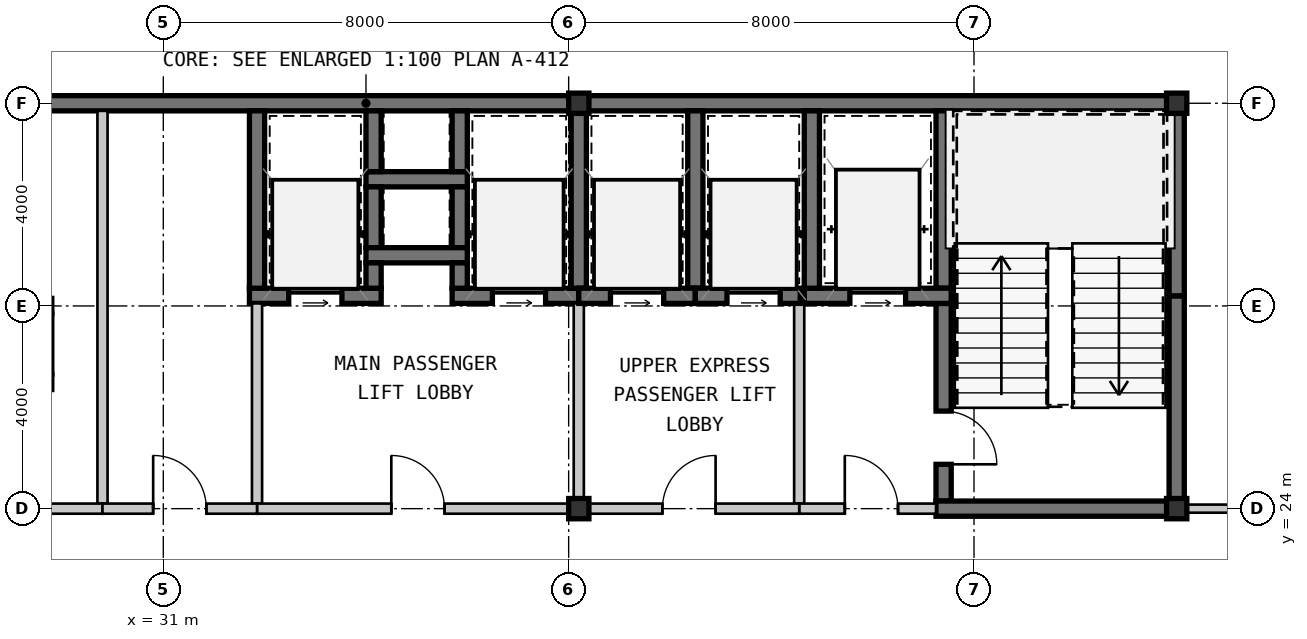
"""IFC4 building model, lengths in metres.
Left out: names, types, materials, properties, quantities, classifications, styles, units other than length and angle.
Written with IfcOpenShell. Run it as: python <this file> out.ifc"""

import sys

from ifc_helpers import new_model, si_unit, direction, frame, frame_2d, origin, origin_2d, place, context, subcontext, project, spatial, rectangle, hollow_rectangle, extrude, source, transform, mapped, element, fill, save


model = new_model("IFC4")
c1 = context("Model", 3, precision=1e-05, world=origin(), true_north=direction((0.0, 1.0)))
c2 = subcontext(c1, "Body", "Model", "MODEL_VIEW")
j1 = project(units=[si_unit("LENGTHUNIT", "METRE"), si_unit("PLANEANGLEUNIT", "RADIAN")], contexts=[c1])
p1 = place(None, origin())
s1 = spatial("IfcSite", under=j1, at=p1, CompositionType="ELEMENT")
p2 = place(p1, origin())
s2 = spatial("IfcBuilding", under=s1, at=p2, CompositionType="ELEMENT")
p3 = place(p2, frame((0.0, 0.0, 116.55)))
s3 = spatial("IfcBuildingStorey", under=s2, at=p3, CompositionType="ELEMENT", Elevation=116.55)
m1 = source(origin(), c2, "Body", "SweptSolid", [
    extrude(hollow_rectangle(XDim=0.4, YDim=0.4, WallThickness=0.016, at=origin_2d()), origin(), (0.0, 0.0, 1.0), 3.85),
])
for number, where, z_axis, x_axis in (
    (1, (39.2, 24.0, 0.0), (0.0, 0.0, 1.0), (1.0, 0.0, 0.0)),
    (2, (51.0, 24.0, 0.0), (0.0, 0.0, 1.0), (1.0, 0.0, 0.0)),
    (3, (39.2, 32.0, 0.0), (0.0, 0.0, 1.0), (1.0, 0.0, 0.0)),
    (4, (51.0, 32.0, 0.0), (0.0, 0.0, 1.0), (1.0, 0.0, 0.0)),
):
    element("IfcColumn", number, at=place(p3, frame(where, z_axis=z_axis, x_axis=x_axis)), inside=s3, PredefinedType="COLUMN", context=c2, shape_type="MappedRepresentation", body=[
        mapped(m1, transform((0.0, 0.0, 0.0), scale=1.0)),
    ])
m2 = source(origin(), c2, "Body", "SweptSolid", [
    extrude(rectangle(XDim=11.2, YDim=0.3, at=frame_2d((5.6, 0.0))), origin(), (0.0, 0.0, 1.0), 3.63),
])
p4 = place(p3, frame((28.0, 32.0, 0.0), z_axis=(0.0, 0.0, 1.0), x_axis=(1.0, 0.0, 0.0)))
e5 = element("IfcWall", 5, at=p4, inside=s3, PredefinedType="SHEAR", context=c2, shape_type="MappedRepresentation", body=[
    mapped(m2, transform((0.0, 0.0, 0.0), scale=1.0)),
])
m3 = source(origin(), c2, "Body", "SweptSolid", [
    extrude(rectangle(XDim=11.95, YDim=0.3, at=frame_2d((5.975, 0.0))), origin(), (0.0, 0.0, 1.0), 3.63),
])
p5 = place(p3, frame((39.2, 32.0, 0.0), z_axis=(0.0, 0.0, 1.0), x_axis=(1.0, 0.0, 0.0)))
e6 = element("IfcWall", 6, at=p5, inside=s3, PredefinedType="SHEAR", context=c2, shape_type="MappedRepresentation", body=[
    mapped(m3, transform((0.0, 0.0, 0.0), scale=1.0)),
])
m4 = source(origin(), c2, "Body", "SweptSolid", [
    extrude(rectangle(XDim=4.05, YDim=0.3, at=frame_2d((2.025, 0.0))), origin(), (0.0, 0.0, 1.0), 3.63),
])
p6 = place(p3, frame((51.0, 24.15, 0.0), z_axis=(0.0, 0.0, 1.0), x_axis=(0.0, 1.0, 0.0)))
e7 = element("IfcWall", 7, at=p6, inside=s3, PredefinedType="SHEAR", context=c2, shape_type="MappedRepresentation", body=[
    mapped(m4, transform((0.0, 0.0, 0.0), scale=1.0)),
])
m5 = source(origin(), c2, "Body", "SweptSolid", [
    extrude(rectangle(XDim=3.65, YDim=0.3, at=frame_2d((1.825, 0.0))), origin(), (0.0, 0.0, 1.0), 3.63),
])
p7 = place(p3, frame((51.0, 28.2, 0.0), z_axis=(0.0, 0.0, 1.0), x_axis=(0.0, 1.0, 0.0)))
e8 = element("IfcWall", 8, at=p7, inside=s3, PredefinedType="SHEAR", context=c2, shape_type="MappedRepresentation", body=[
    mapped(m5, transform((0.0, 0.0, 0.0), scale=1.0)),
])
m6 = source(origin(), c2, "Body", "SweptSolid", [
    extrude(rectangle(XDim=3.5, YDim=0.3, at=frame_2d((1.75, 0.0))), origin(), (0.0, 0.0, 1.0), 3.63),
])
p8 = place(p3, frame((46.4, 31.85, 0.0), z_axis=(0.0, 0.0, 1.0), x_axis=(0.0, -1.0, 0.0)))
e9 = element("IfcWall", 9, at=p8, inside=s3, PredefinedType="SHEAR", context=c2, shape_type="MappedRepresentation", body=[
    mapped(m6, transform((0.0, 0.0, 0.0), scale=1.0)),
])
m7 = source(origin(), c2, "Body", "SweptSolid", [
    extrude(rectangle(XDim=3.9, YDim=0.3, at=frame_2d((1.95, 0.0))), origin(), (0.0, 0.0, 1.0), 3.63),
])
p9 = place(p3, frame((46.4, 28.05, 0.0), z_axis=(0.0, 0.0, 1.0), x_axis=(0.0, -1.0, 0.0)))
e10 = element("IfcWall", 10, at=p9, inside=s3, PredefinedType="SHEAR", context=c2, shape_type="MappedRepresentation", body=[
    mapped(m7, transform((0.0, 0.0, 0.0), scale=1.0)),
])
m8 = source(origin(), c2, "Body", "SweptSolid", [
    extrude(rectangle(XDim=1.05, YDim=2.1, at=frame_2d((0.525, 1.05))), frame((0.0, 0.16, 0.0), z_axis=(0.0, -1.0, 0.0), x_axis=(1.0, 0.0, 0.0)), (0.0, 0.0, 1.0), 0.32),
])
p10 = place(p9, frame((2.125, 0.0, 0.0)))
e11 = element("IfcOpeningElement", 11, at=p10, cuts=e10, PredefinedType="OPENING", context=c2, shape_type="MappedRepresentation", body=[
    mapped(m8, transform((0.0, 0.0, 0.0), scale=1.0)),
])
m9 = source(origin(), c2, "Body", "SweptSolid", [
    extrude(rectangle(XDim=4.9, YDim=0.3, at=frame_2d((2.45, 0.0))), origin(), (0.0, 0.0, 1.0), 3.63),
])
p11 = place(p3, frame((46.25, 24.0, 0.0), z_axis=(0.0, 0.0, 1.0), x_axis=(1.0, 0.0, 0.0)))
e12 = element("IfcWall", 12, at=p11, inside=s3, PredefinedType="SHEAR", context=c2, shape_type="MappedRepresentation", body=[
    mapped(m9, transform((0.0, 0.0, 0.0), scale=1.0)),
])
m10 = source(origin(), c2, "Body", "SweptSolid", [
    extrude(rectangle(XDim=2.9, YDim=0.3, at=frame_2d((1.45, 0.0))), origin(), (0.0, 0.0, 1.0), 3.63),
])
p12 = place(p3, frame((43.65, 28.2, 0.0), z_axis=(0.0, 0.0, 1.0), x_axis=(1.0, 0.0, 0.0)))
e13 = element("IfcWall", 13, at=p12, inside=s3, PredefinedType="SHEAR", context=c2, shape_type="MappedRepresentation", body=[
    mapped(m10, transform((0.0, 0.0, 0.0), scale=1.0)),
])
m11 = source(origin(), c2, "Body", "SweptSolid", [
    extrude(rectangle(XDim=1.1, YDim=2.15, at=frame_2d((0.55, 1.075))), frame((0.0, 0.16, 0.0), z_axis=(0.0, -1.0, 0.0), x_axis=(1.0, 0.0, 0.0)), (0.0, 0.0, 1.0), 0.32),
])
p13 = place(p12, frame((0.9, 0.0, 0.0)))
e14 = element("IfcOpeningElement", 14, at=p13, cuts=e13, PredefinedType="OPENING", context=c2, shape_type="MappedRepresentation", body=[
    mapped(m11, transform((0.0, 0.0, 0.0), scale=1.0)),
])
p14 = place(p3, frame((43.8, 31.85, 0.0), z_axis=(0.0, 0.0, 1.0), x_axis=(0.0, -1.0, 0.0)))
e15 = element("IfcWall", 15, at=p14, inside=s3, PredefinedType="SHEAR", context=c2, shape_type="MappedRepresentation", body=[
    mapped(m6, transform((0.0, 0.0, 0.0), scale=1.0)),
])
m12 = source(origin(), c2, "Body", "SweptSolid", [
    extrude(rectangle(XDim=3.95, YDim=0.2, at=frame_2d((1.975, 0.0))), origin(), (0.0, 0.0, 1.0), 3.63),
])
p15 = place(p3, frame((43.55, 28.05, 0.0), z_axis=(0.0, 0.0, 1.0), x_axis=(0.0, -1.0, 0.0)))
e16 = element("IfcWall", 16, at=p15, inside=s3, PredefinedType="SOLIDWALL", context=c2, shape_type="MappedRepresentation", body=[
    mapped(m12, transform((0.0, 0.0, 0.0), scale=1.0)),
])
m13 = source(origin(), c2, "Body", "SweptSolid", [
    extrude(rectangle(XDim=2.7, YDim=0.2, at=frame_2d((1.35, 0.0))), origin(), (0.0, 0.0, 1.0), 3.097),
])
p16 = place(p3, frame((43.55, 24.0, 0.0), z_axis=(0.0, 0.0, 1.0), x_axis=(1.0, 0.0, 0.0)))
e17 = element("IfcWall", 17, at=p16, inside=s3, PredefinedType="SOLIDWALL", context=c2, shape_type="MappedRepresentation", body=[
    mapped(m13, transform((0.0, 0.0, 0.0), scale=1.0)),
])
m14 = source(origin(), c2, "Body", "SweptSolid", [
    extrude(rectangle(XDim=1.05, YDim=2.1, at=frame_2d((0.525, 1.05))), frame((0.0, 0.11, 0.0), z_axis=(0.0, -1.0, 0.0), x_axis=(1.0, 0.0, 0.0)), (0.0, 0.0, 1.0), 0.22),
])
p17 = place(p16, frame((0.9, 0.0, 0.0)))
e18 = element("IfcOpeningElement", 18, at=p17, cuts=e17, PredefinedType="OPENING", context=c2, shape_type="MappedRepresentation", body=[
    mapped(m14, transform((0.0, 0.0, 0.0), scale=1.0)),
])
m15 = source(origin(), c2, "Body", "SweptSolid", [
    extrude(rectangle(XDim=2.0, YDim=0.3, at=frame_2d((1.0, 0.0))), origin(), (0.0, 0.0, 1.0), 3.63),
])
p18 = place(p3, frame((35.0, 30.5, 0.0), z_axis=(0.0, 0.0, 1.0), x_axis=(1.0, 0.0, 0.0)))
e19 = element("IfcWall", 19, at=p18, inside=s3, PredefinedType="SHEAR", context=c2, shape_type="MappedRepresentation", body=[
    mapped(m15, transform((0.0, 0.0, 0.0), scale=1.0)),
])
m16 = source(origin(), c2, "Body", "SweptSolid", [
    extrude(rectangle(XDim=1.2, YDim=0.3, at=frame_2d((0.6, 0.0))), origin(), (0.0, 0.0, 1.0), 3.63),
])
for number, where, z_axis, x_axis in (
    (20, (35.15, 31.85, 0.0), (0.0, 0.0, 1.0), (0.0, -1.0, 0.0)),
    (21, (36.85, 30.65, 0.0), (0.0, 0.0, 1.0), (0.0, 1.0, 0.0)),
    (22, (35.15, 30.35, 0.0), (0.0, 0.0, 1.0), (0.0, -1.0, 0.0)),
    (23, (36.85, 29.15, 0.0), (0.0, 0.0, 1.0), (0.0, 1.0, 0.0)),
):
    element("IfcWall", number, at=place(p3, frame(where, z_axis=z_axis, x_axis=x_axis)), inside=s3, PredefinedType="SHEAR", context=c2, shape_type="MappedRepresentation", body=[
        mapped(m16, transform((0.0, 0.0, 0.0), scale=1.0)),
    ])
p19 = place(p3, frame((35.0, 29.0, 0.0), z_axis=(0.0, 0.0, 1.0), x_axis=(1.0, 0.0, 0.0)))
e24 = element("IfcWall", 24, at=p19, inside=s3, PredefinedType="SHEAR", context=c2, shape_type="MappedRepresentation", body=[
    mapped(m15, transform((0.0, 0.0, 0.0), scale=1.0)),
])
m17 = source(origin(), c2, "Body", "SweptSolid", [
    extrude(rectangle(XDim=1.7, YDim=0.3, at=frame_2d((0.85, 0.0))), origin(), (0.0, 0.0, 1.0), 3.63),
])
p20 = place(p3, frame((27.1, 26.5, 0.0), z_axis=(0.0, 0.0, 1.0), x_axis=(1.0, 0.0, 0.0)))
e25 = element("IfcWall", 25, at=p20, inside=s3, PredefinedType="SHEAR", context=c2, shape_type="MappedRepresentation", body=[
    mapped(m17, transform((0.0, 0.0, 0.0), scale=1.0)),
])
m18 = source(origin(), c2, "Body", "SweptSolid", [
    extrude(rectangle(XDim=2.6, YDim=0.3, at=frame_2d((1.3, 0.0))), origin(), (0.0, 0.0, 1.0), 3.63),
])
p21 = place(p3, frame((32.7, 28.2, 0.0), z_axis=(0.0, 0.0, 1.0), x_axis=(1.0, 0.0, 0.0)))
e26 = element("IfcWall", 26, at=p21, inside=s3, PredefinedType="SHEAR", context=c2, shape_type="MappedRepresentation", body=[
    mapped(m18, transform((0.0, 0.0, 0.0), scale=1.0)),
])
m19 = source(origin(), c2, "Body", "SweptSolid", [
    extrude(rectangle(XDim=1.05, YDim=2.15, at=frame_2d((0.525, 1.075))), frame((0.0, 0.16, 0.0), z_axis=(0.0, -1.0, 0.0), x_axis=(1.0, 0.0, 0.0)), (0.0, 0.0, 1.0), 0.32),
])
p22 = place(p21, frame((0.775, 0.0, 0.0)))
e27 = element("IfcOpeningElement", 27, at=p22, cuts=e26, PredefinedType="OPENING", context=c2, shape_type="MappedRepresentation", body=[
    mapped(m19, transform((0.0, 0.0, 0.0), scale=1.0)),
])
m20 = source(origin(), c2, "Body", "SweptSolid", [
    extrude(rectangle(XDim=0.5, YDim=0.3, at=frame_2d((0.25, 0.0))), origin(), (0.0, 0.0, 1.0), 3.63),
])
p23 = place(p3, frame((35.15, 28.35, 0.0), z_axis=(0.0, 0.0, 1.0), x_axis=(0.0, 1.0, 0.0)))
e28 = element("IfcWall", 28, at=p23, inside=s3, PredefinedType="SHEAR", context=c2, shape_type="MappedRepresentation", body=[
    mapped(m20, transform((0.0, 0.0, 0.0), scale=1.0)),
])
p24 = place(p3, frame((32.85, 31.85, 0.0), z_axis=(0.0, 0.0, 1.0), x_axis=(0.0, -1.0, 0.0)))
e29 = element("IfcWall", 29, at=p24, inside=s3, PredefinedType="SHEAR", context=c2, shape_type="MappedRepresentation", body=[
    mapped(m6, transform((0.0, 0.0, 0.0), scale=1.0)),
])
m21 = source(origin(), c2, "Body", "SweptSolid", [
    extrude(rectangle(XDim=2.5, YDim=0.3, at=frame_2d((1.25, 0.0))), origin(), (0.0, 0.0, 1.0), 3.63),
])
p25 = place(p3, frame((36.7, 28.2, 0.0), z_axis=(0.0, 0.0, 1.0), x_axis=(1.0, 0.0, 0.0)))
e30 = element("IfcWall", 30, at=p25, inside=s3, PredefinedType="SHEAR", context=c2, shape_type="MappedRepresentation", body=[
    mapped(m21, transform((0.0, 0.0, 0.0), scale=1.0)),
])
p26 = place(p25, frame((0.795, 0.0, 0.0)))
e31 = element("IfcOpeningElement", 31, at=p26, cuts=e30, PredefinedType="OPENING", context=c2, shape_type="MappedRepresentation", body=[
    mapped(m19, transform((0.0, 0.0, 0.0), scale=1.0)),
])
p27 = place(p3, frame((36.85, 28.85, 0.0), z_axis=(0.0, 0.0, 1.0), x_axis=(0.0, -1.0, 0.0)))
e32 = element("IfcWall", 32, at=p27, inside=s3, PredefinedType="SHEAR", context=c2, shape_type="MappedRepresentation", body=[
    mapped(m20, transform((0.0, 0.0, 0.0), scale=1.0)),
])
p28 = place(p3, frame((39.2, 28.35, 0.0), z_axis=(0.0, 0.0, 1.0), x_axis=(0.0, 1.0, 0.0)))
e33 = element("IfcWall", 33, at=p28, inside=s3, PredefinedType="SHEAR", context=c2, shape_type="MappedRepresentation", body=[
    mapped(m6, transform((0.0, 0.0, 0.0), scale=1.0)),
])
m22 = source(origin(), c2, "Body", "SweptSolid", [
    extrude(rectangle(XDim=3.95, YDim=0.2, at=frame_2d((1.975, 0.0))), origin(), (0.0, 0.0, 1.0), 3.17),
])
p29 = place(p3, frame((39.2, 28.05, 0.0), z_axis=(0.0, 0.0, 1.0), x_axis=(0.0, -1.0, 0.0)))
e34 = element("IfcWall", 34, at=p29, inside=s3, PredefinedType="SOLIDWALL", context=c2, shape_type="MappedRepresentation", body=[
    mapped(m22, transform((0.0, 0.0, 0.0), scale=1.0)),
])
p30 = place(p3, frame((32.85, 24.1, 0.0), z_axis=(0.0, 0.0, 1.0), x_axis=(0.0, 1.0, 0.0)))
e35 = element("IfcWall", 35, at=p30, inside=s3, PredefinedType="SOLIDWALL", context=c2, shape_type="MappedRepresentation", body=[
    mapped(m12, transform((0.0, 0.0, 0.0), scale=1.0)),
])
m23 = source(origin(), c2, "Body", "SweptSolid", [
    extrude(rectangle(XDim=6.35, YDim=0.2, at=frame_2d((3.175, 0.0))), origin(), (0.0, 0.0, 1.0), 3.17),
])
p31 = place(p3, frame((39.2, 24.0, 0.0), z_axis=(0.0, 0.0, 1.0), x_axis=(-1.0, 0.0, 0.0)))
e36 = element("IfcWall", 36, at=p31, inside=s3, PredefinedType="SOLIDWALL", context=c2, shape_type="MappedRepresentation", body=[
    mapped(m23, transform((0.0, 0.0, 0.0), scale=1.0)),
])
p32 = place(p31, frame((2.65, 0.0, 0.0)))
e37 = element("IfcOpeningElement", 37, at=p32, cuts=e36, PredefinedType="OPENING", context=c2, shape_type="MappedRepresentation", body=[
    mapped(m14, transform((0.0, 0.0, 0.0), scale=1.0)),
])
p33 = place(p3, frame((41.5, 28.35, 0.0), z_axis=(0.0, 0.0, 1.0), x_axis=(0.0, 1.0, 0.0)))
e38 = element("IfcWall", 38, at=p33, inside=s3, PredefinedType="SHEAR", context=c2, shape_type="MappedRepresentation", body=[
    mapped(m6, transform((0.0, 0.0, 0.0), scale=1.0)),
])
m24 = source(origin(), c2, "Body", "SweptSolid", [
    extrude(rectangle(XDim=2.3, YDim=0.3, at=frame_2d((1.15, 0.0))), origin(), (0.0, 0.0, 1.0), 3.63),
])
p34 = place(p3, frame((39.2, 28.2, 0.0), z_axis=(0.0, 0.0, 1.0), x_axis=(1.0, 0.0, 0.0)))
e39 = element("IfcWall", 39, at=p34, inside=s3, PredefinedType="SHEAR", context=c2, shape_type="MappedRepresentation", body=[
    mapped(m24, transform((0.0, 0.0, 0.0), scale=1.0)),
])
p35 = place(p34, frame((0.625, 0.0, 0.0)))
e40 = element("IfcOpeningElement", 40, at=p35, cuts=e39, PredefinedType="OPENING", context=c2, shape_type="MappedRepresentation", body=[
    mapped(m19, transform((0.0, 0.0, 0.0), scale=1.0)),
])
m25 = source(origin(), c2, "Body", "SweptSolid", [
    extrude(rectangle(XDim=2.07, YDim=0.3, at=frame_2d((1.035, 0.0))), origin(), (0.0, 0.0, 1.0), 3.63),
])
p36 = place(p3, frame((41.5, 28.2, 0.0), z_axis=(0.0, 0.0, 1.0), x_axis=(1.0, 0.0, 0.0)))
e41 = element("IfcWall", 41, at=p36, inside=s3, PredefinedType="SHEAR", context=c2, shape_type="MappedRepresentation", body=[
    mapped(m25, transform((0.0, 0.0, 0.0), scale=1.0)),
])
p37 = place(p36, frame((0.625, 0.0, 0.0)))
e42 = element("IfcOpeningElement", 42, at=p37, cuts=e41, PredefinedType="OPENING", context=c2, shape_type="MappedRepresentation", body=[
    mapped(m19, transform((0.0, 0.0, 0.0), scale=1.0)),
])
m26 = source(origin(), c2, "Body", "SweptSolid", [
    extrude(rectangle(XDim=4.35, YDim=0.2, at=frame_2d((2.175, 0.0))), origin(), (0.0, 0.0, 1.0), 3.097),
])
p38 = place(p3, frame((43.55, 24.0, 0.0), z_axis=(0.0, 0.0, 1.0), x_axis=(-1.0, 0.0, 0.0)))
e43 = element("IfcWall", 43, at=p38, inside=s3, PredefinedType="SOLIDWALL", context=c2, shape_type="MappedRepresentation", body=[
    mapped(m26, transform((0.0, 0.0, 0.0), scale=1.0)),
])
p39 = place(p38, frame((1.65, 0.0, 0.0)))
e44 = element("IfcOpeningElement", 44, at=p39, cuts=e43, PredefinedType="OPENING", context=c2, shape_type="MappedRepresentation", body=[
    mapped(m14, transform((0.0, 0.0, 0.0), scale=1.0)),
])
m27 = source(origin(), c2, "Body", "SweptSolid", [
    extrude(rectangle(XDim=7.75, YDim=0.2, at=frame_2d((3.875, 0.0))), origin(), (0.0, 0.0, 1.0), 3.63),
])
p40 = place(p3, frame((29.8, 31.85, 0.0), z_axis=(0.0, 0.0, 1.0), x_axis=(0.0, -1.0, 0.0)))
e45 = element("IfcWall", 45, at=p40, inside=s3, PredefinedType="SOLIDWALL", context=c2, shape_type="MappedRepresentation", body=[
    mapped(m27, transform((0.0, 0.0, 0.0), scale=1.0)),
])
m28 = source(origin(), c2, "Body", "SweptSolid", [
    extrude(rectangle(XDim=3.35, YDim=0.2, at=frame_2d((1.675, 0.0))), origin(), (0.0, 0.0, 1.0), 3.17),
])
p41 = place(p3, frame((29.8, 24.0, 0.0), z_axis=(0.0, 0.0, 1.0), x_axis=(-1.0, 0.0, 0.0)))
e46 = element("IfcWall", 46, at=p41, inside=s3, PredefinedType="SOLIDWALL", context=c2, shape_type="MappedRepresentation", body=[
    mapped(m28, transform((0.0, 0.0, 0.0), scale=1.0)),
])
m29 = source(origin(), c2, "Body", "SweptSolid", [
    extrude(rectangle(XDim=3.05, YDim=0.2, at=frame_2d((1.525, 0.0))), origin(), (0.0, 0.0, 1.0), 3.17),
])
p42 = place(p3, frame((32.85, 24.0, 0.0), z_axis=(0.0, 0.0, 1.0), x_axis=(-1.0, 0.0, 0.0)))
e47 = element("IfcWall", 47, at=p42, inside=s3, PredefinedType="SOLIDWALL", context=c2, shape_type="MappedRepresentation", body=[
    mapped(m29, transform((0.0, 0.0, 0.0), scale=1.0)),
])
p43 = place(p42, frame((1.0, 0.0, 0.0)))
e48 = element("IfcOpeningElement", 48, at=p43, cuts=e47, PredefinedType="OPENING", context=c2, shape_type="MappedRepresentation", body=[
    mapped(m14, transform((0.0, 0.0, 0.0), scale=1.0)),
])
m30 = source(origin(), c2, "Body", "SweptSolid", [
    extrude(rectangle(XDim=10.1, YDim=0.16, at=frame_2d((5.05, 0.0))), origin(), (0.0, 0.0, 1.0), 3.63),
])
p44 = place(p3, frame((51.15, 24.0, 0.0), z_axis=(0.0, 0.0, 1.0), x_axis=(1.0, 0.0, 0.0)))
e49 = element("IfcWall", 49, at=p44, inside=s3, PredefinedType="PARTITIONING", context=c2, shape_type="MappedRepresentation", body=[
    mapped(m30, transform((0.0, 0.0, 0.0), scale=1.0)),
])
m31 = source(origin(), c2, "Body", "SweptSolid", [
    extrude(rectangle(XDim=0.92, YDim=2.1, at=frame_2d((0.46, 1.05))), frame((0.0, 0.09, 0.0), z_axis=(0.0, -1.0, 0.0), x_axis=(1.0, 0.0, 0.0)), (0.0, 0.0, 1.0), 0.18),
])
p45 = place(p44, frame((4.525, 0.0, 0.0)))
e50 = element("IfcOpeningElement", 50, at=p45, cuts=e49, PredefinedType="OPENING", context=c2, shape_type="MappedRepresentation", body=[
    mapped(m31, transform((0.0, 0.0, 0.0), scale=1.0)),
])
m32 = source(origin(), c2, "Body", "SweptSolid", [
    extrude(rectangle(XDim=1.05, YDim=2.1, at=frame_2d((0.525, 1.05))), frame((0.0, 0.025, 0.0), z_axis=(0.0, -1.0, 0.0), x_axis=(1.0, 0.0, 0.0)), (0.0, 0.0, 1.0), 0.05),
])
p46 = place(p10, origin())
e51 = element("IfcDoor", 51, at=p46, inside=s3, OperationType="SINGLE_SWING_RIGHT", PredefinedType="DOOR", context=c2, shape_type="MappedRepresentation", body=[
    mapped(m32, transform((0.0, 0.0, 0.0), scale=1.0)),
])
fill(e11, e51)
m33 = source(origin(), c2, "Body", "SweptSolid", [
    extrude(rectangle(XDim=1.1, YDim=2.15, at=frame_2d((0.55, 1.075))), frame((0.0, 0.025, 0.0), z_axis=(0.0, -1.0, 0.0), x_axis=(1.0, 0.0, 0.0)), (0.0, 0.0, 1.0), 0.05),
])
p47 = place(p13, origin())
e52 = element("IfcDoor", 52, at=p47, inside=s3, OperationType="SLIDING_TO_LEFT", PredefinedType="DOOR", context=c2, shape_type="MappedRepresentation", body=[
    mapped(m33, transform((0.0, 0.0, 0.0), scale=1.0)),
])
fill(e14, e52)
p48 = place(p17, origin())
e53 = element("IfcDoor", 53, at=p48, inside=s3, OperationType="SINGLE_SWING_LEFT", PredefinedType="DOOR", context=c2, shape_type="MappedRepresentation", body=[
    mapped(m32, transform((0.0, 0.0, 0.0), scale=1.0)),
])
fill(e18, e53)
m34 = source(origin(), c2, "Body", "SweptSolid", [
    extrude(rectangle(XDim=1.05, YDim=2.15, at=frame_2d((0.525, 1.075))), frame((0.0, 0.025, 0.0), z_axis=(0.0, -1.0, 0.0), x_axis=(1.0, 0.0, 0.0)), (0.0, 0.0, 1.0), 0.05),
])
p49 = place(p22, origin())
e54 = element("IfcDoor", 54, at=p49, inside=s3, OperationType="SLIDING_TO_LEFT", PredefinedType="DOOR", context=c2, shape_type="MappedRepresentation", body=[
    mapped(m34, transform((0.0, 0.0, 0.0), scale=1.0)),
])
fill(e27, e54)
p50 = place(p26, origin())
e55 = element("IfcDoor", 55, at=p50, inside=s3, OperationType="SLIDING_TO_LEFT", PredefinedType="DOOR", context=c2, shape_type="MappedRepresentation", body=[
    mapped(m34, transform((0.0, 0.0, 0.0), scale=1.0)),
])
fill(e31, e55)
p51 = place(p32, frame((1.05, 0.0, 0.0), z_axis=(0.0, 0.0, 1.0), x_axis=(-1.0, 0.0, 0.0)))
e56 = element("IfcDoor", 56, at=p51, inside=s3, OperationType="SINGLE_SWING_LEFT", PredefinedType="DOOR", context=c2, shape_type="MappedRepresentation", body=[
    mapped(m32, transform((0.0, 0.0, 0.0), scale=1.0)),
])
fill(e37, e56)
p52 = place(p35, origin())
e57 = element("IfcDoor", 57, at=p52, inside=s3, OperationType="SLIDING_TO_LEFT", PredefinedType="DOOR", context=c2, shape_type="MappedRepresentation", body=[
    mapped(m34, transform((0.0, 0.0, 0.0), scale=1.0)),
])
fill(e40, e57)
p53 = place(p37, origin())
e58 = element("IfcDoor", 58, at=p53, inside=s3, OperationType="SLIDING_TO_LEFT", PredefinedType="DOOR", context=c2, shape_type="MappedRepresentation", body=[
    mapped(m34, transform((0.0, 0.0, 0.0), scale=1.0)),
])
fill(e42, e58)
p54 = place(p39, frame((1.05, 0.0, 0.0), z_axis=(0.0, 0.0, 1.0), x_axis=(-1.0, 0.0, 0.0)))
e59 = element("IfcDoor", 59, at=p54, inside=s3, OperationType="SINGLE_SWING_RIGHT", PredefinedType="DOOR", context=c2, shape_type="MappedRepresentation", body=[
    mapped(m32, transform((0.0, 0.0, 0.0), scale=1.0)),
])
fill(e44, e59)
p55 = place(p43, frame((1.05, 0.0, 0.0), z_axis=(0.0, 0.0, 1.0), x_axis=(-1.0, 0.0, 0.0)))
e60 = element("IfcDoor", 60, at=p55, inside=s3, OperationType="SINGLE_SWING_LEFT", PredefinedType="DOOR", context=c2, shape_type="MappedRepresentation", body=[
    mapped(m32, transform((0.0, 0.0, 0.0), scale=1.0)),
])
fill(e48, e60)
save(model, sys.argv[1])
